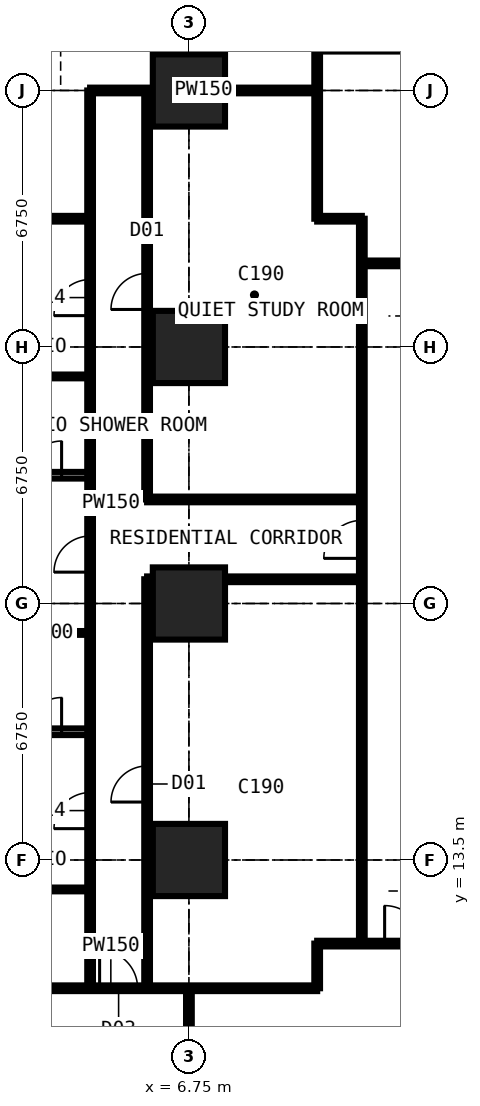
"""IFC4 building model, lengths in metres.
Left out: names, types, materials, properties, quantities, classifications, styles, units other than length and angle.
Written with IfcOpenShell. Run it as: python <this file> out.ifc"""

import sys

from ifc_helpers import new_model, si_unit, direction, frame, frame_2d, origin, origin_2d, place, context, subcontext, project, spatial, rectangle, extrude, element, fill, save


model = new_model("IFC4")
c1 = context("Model", 3, precision=1e-05, world=origin(), true_north=direction((0.0, 1.0)))
c2 = subcontext(c1, "Body", "Model", "MODEL_VIEW")
j1 = project(units=[si_unit("LENGTHUNIT", "METRE"), si_unit("PLANEANGLEUNIT", "RADIAN")], contexts=[c1])
p1 = place(None, origin())
s1 = spatial("IfcSite", under=j1, at=p1, CompositionType="ELEMENT")
p2 = place(p1, origin())
s2 = spatial("IfcBuilding", under=s1, at=p2, CompositionType="ELEMENT")
p3 = place(p2, frame((0.0, 0.0, 28.8)))
s3 = spatial("IfcBuildingStorey", under=s2, at=p3, CompositionType="ELEMENT", Elevation=28.8)
for number, where, z_axis, x_axis in (
    (1, (6.75, 13.5, 0.0), (0.0, 0.0, 1.0), (1.0, 0.0, 0.0)),
    (2, (6.75, 20.25, 0.0), (0.0, 0.0, 1.0), (1.0, 0.0, 0.0)),
    (3, (6.75, 27.0, 0.0), (0.0, 0.0, 1.0), (1.0, 0.0, 0.0)),
    (4, (6.75, 33.75, 0.0), (0.0, 0.0, 1.0), (1.0, 0.0, 0.0)),
):
    element("IfcColumn", number, at=place(p3, frame(where, z_axis=z_axis, x_axis=x_axis)), inside=s3, PredefinedType="COLUMN", context=c2, shape_type="SweptSolid", body=[
        extrude(rectangle(XDim=1.9, YDim=1.9, at=origin_2d()), origin(), (0.0, 0.0, 1.0), 3.6),
    ])
p4 = place(p3, frame((-0.734, 10.125, 0.0), z_axis=(0.0, 0.0, 1.0), x_axis=(1.0, 0.0, 0.0)))
e5 = element("IfcWall", 5, at=p4, inside=s3, PredefinedType="PARTITIONING", context=c2, shape_type="SweptSolid", body=[
    extrude(rectangle(XDim=10.859, YDim=0.15, at=frame_2d((5.429, 0.0))), origin(), (0.0, 0.0, 1.0), 3.375),
])
p5 = place(p4, frame((5.134, 0.0, 0.0)))
e6 = element("IfcOpeningElement", 6, at=p5, cuts=e5, PredefinedType="OPENING", context=c2, shape_type="SweptSolid", body=[
    extrude(rectangle(XDim=1.0, YDim=2.2, at=frame_2d((0.5, 1.1))), frame((0.0, 0.085, 0.0), z_axis=(0.0, -1.0, 0.0), x_axis=(1.0, 0.0, 0.0)), (0.0, 0.0, 1.0), 0.17),
])
p6 = place(p3, frame((-0.734, 16.875, 0.0), z_axis=(0.0, 0.0, 1.0), x_axis=(1.0, 0.0, 0.0)))
e7 = element("IfcWall", 7, at=p6, inside=s3, PredefinedType="PARTITIONING", context=c2, shape_type="SweptSolid", body=[
    extrude(rectangle(XDim=4.884, YDim=0.175, at=frame_2d((2.442, 0.0))), origin(), (0.0, 0.0, 1.0), 3.375),
])
p7 = place(p6, frame((3.234, 0.0, 0.0)))
e8 = element("IfcOpeningElement", 8, at=p7, cuts=e7, PredefinedType="OPENING", context=c2, shape_type="SweptSolid", body=[
    extrude(rectangle(XDim=0.9, YDim=2.2, at=frame_2d((0.45, 1.1))), frame((0.0, 0.097, 0.0), z_axis=(0.0, -1.0, 0.0), x_axis=(1.0, 0.0, 0.0)), (0.0, 0.0, 1.0), 0.195),
])
p8 = place(p3, frame((-0.734, 23.625, 0.0), z_axis=(0.0, 0.0, 1.0), x_axis=(1.0, 0.0, 0.0)))
e9 = element("IfcWall", 9, at=p8, inside=s3, PredefinedType="PARTITIONING", context=c2, shape_type="SweptSolid", body=[
    extrude(rectangle(XDim=4.884, YDim=0.175, at=frame_2d((2.442, 0.0))), origin(), (0.0, 0.0, 1.0), 3.375),
])
p9 = place(p8, frame((3.234, 0.0, 0.0)))
e10 = element("IfcOpeningElement", 10, at=p9, cuts=e9, PredefinedType="OPENING", context=c2, shape_type="SweptSolid", body=[
    extrude(rectangle(XDim=0.9, YDim=2.2, at=frame_2d((0.45, 1.1))), frame((0.0, 0.097, 0.0), z_axis=(0.0, -1.0, 0.0), x_axis=(1.0, 0.0, 0.0)), (0.0, 0.0, 1.0), 0.195),
])
p10 = place(p3, frame((-0.734, 30.375, 0.0), z_axis=(0.0, 0.0, 1.0), x_axis=(1.0, 0.0, 0.0)))
e11 = element("IfcWall", 11, at=p10, inside=s3, PredefinedType="PARTITIONING", context=c2, shape_type="SweptSolid", body=[
    extrude(rectangle(XDim=4.884, YDim=0.15, at=frame_2d((2.442, 0.0))), origin(), (0.0, 0.0, 1.0), 3.375),
])
for number, where, z_axis, x_axis in (
    (12, (1.75, 12.725, 0.0), (0.0, 0.0, 1.0), (1.0, 0.0, 0.0)),
    (13, (1.75, 19.475, 0.0), (0.0, 0.0, 1.0), (1.0, 0.0, 0.0)),
    (14, (1.75, 26.225, 0.0), (0.0, 0.0, 1.0), (1.0, 0.0, 0.0)),
):
    element("IfcWall", number, at=place(p3, frame(where, z_axis=z_axis, x_axis=x_axis)), inside=s3, PredefinedType="PARTITIONING", context=c2, shape_type="SweptSolid", body=[
        extrude(rectangle(XDim=2.4, YDim=0.1, at=frame_2d((1.2, 0.0))), origin(), (0.0, 0.0, 1.0), 3.375),
    ])
p11 = place(p3, frame((4.15, 10.125, 0.0), z_axis=(0.0, 0.0, 1.0), x_axis=(0.0, 1.0, 0.0)))
e15 = element("IfcWall", 15, at=p11, inside=s3, PredefinedType="PARTITIONING", context=c2, shape_type="SweptSolid", body=[
    extrude(rectangle(XDim=23.625, YDim=0.15, at=frame_2d((11.812, 0.0))), origin(), (0.0, 0.0, 1.0), 3.375),
])
p12 = place(p11, frame((4.2, 0.0, 0.0)))
e16 = element("IfcOpeningElement", 16, at=p12, cuts=e15, PredefinedType="OPENING", context=c2, shape_type="SweptSolid", body=[
    extrude(rectangle(XDim=0.95, YDim=2.2, at=frame_2d((0.475, 1.1))), frame((0.0, 0.085, 0.0), z_axis=(0.0, -1.0, 0.0), x_axis=(1.0, 0.0, 0.0)), (0.0, 0.0, 1.0), 0.17),
])
p13 = place(p11, frame((10.95, 0.0, 0.0)))
e17 = element("IfcOpeningElement", 17, at=p13, cuts=e15, PredefinedType="OPENING", context=c2, shape_type="SweptSolid", body=[
    extrude(rectangle(XDim=0.95, YDim=2.2, at=frame_2d((0.475, 1.1))), frame((0.0, 0.085, 0.0), z_axis=(0.0, -1.0, 0.0), x_axis=(1.0, 0.0, 0.0)), (0.0, 0.0, 1.0), 0.17),
])
p14 = place(p11, frame((17.7, 0.0, 0.0)))
e18 = element("IfcOpeningElement", 18, at=p14, cuts=e15, PredefinedType="OPENING", context=c2, shape_type="SweptSolid", body=[
    extrude(rectangle(XDim=0.95, YDim=2.2, at=frame_2d((0.475, 1.1))), frame((0.0, 0.085, 0.0), z_axis=(0.0, -1.0, 0.0), x_axis=(1.0, 0.0, 0.0)), (0.0, 0.0, 1.0), 0.17),
])
p15 = place(p3, frame((4.15, 33.75, 0.0), z_axis=(0.0, 0.0, 1.0), x_axis=(1.0, 0.0, 0.0)))
e19 = element("IfcWall", 19, at=p15, inside=s3, PredefinedType="PARTITIONING", context=c2, shape_type="SweptSolid", body=[
    extrude(rectangle(XDim=5.975, YDim=0.15, at=frame_2d((2.988, 0.0))), origin(), (0.0, 0.0, 1.0), 2.877),
])
p16 = place(p3, frame((5.65, 10.125, 0.0), z_axis=(0.0, 0.0, 1.0), x_axis=(0.0, 1.0, 0.0)))
e20 = element("IfcWall", 20, at=p16, inside=s3, PredefinedType="PARTITIONING", context=c2, shape_type="SweptSolid", body=[
    extrude(rectangle(XDim=10.762, YDim=0.15, at=frame_2d((5.381, 0.0))), origin(), (0.0, 0.0, 1.0), 3.375),
])
p17 = place(p16, frame((4.9, 0.0, 0.0)))
e21 = element("IfcOpeningElement", 21, at=p17, cuts=e20, PredefinedType="OPENING", context=c2, shape_type="SweptSolid", body=[
    extrude(rectangle(XDim=0.95, YDim=2.2, at=frame_2d((0.475, 1.1))), frame((0.0, 0.085, 0.0), z_axis=(0.0, -1.0, 0.0), x_axis=(1.0, 0.0, 0.0)), (0.0, 0.0, 1.0), 0.17),
])
p18 = place(p3, frame((5.65, 20.887, 0.0), z_axis=(0.0, 0.0, 1.0), x_axis=(1.0, 0.0, 0.0)))
e22 = element("IfcWall", 22, at=p18, inside=s3, PredefinedType="PARTITIONING", context=c2, shape_type="SweptSolid", body=[
    extrude(rectangle(XDim=5.65, YDim=0.15, at=frame_2d((2.825, 0.0))), origin(), (0.0, 0.0, 1.0), 3.375),
])
p19 = place(p3, frame((5.65, 22.988, 0.0), z_axis=(0.0, 0.0, 1.0), x_axis=(0.0, 1.0, 0.0)))
e23 = element("IfcWall", 23, at=p19, inside=s3, PredefinedType="PARTITIONING", context=c2, shape_type="SweptSolid", body=[
    extrude(rectangle(XDim=10.762, YDim=0.15, at=frame_2d((5.381, 0.0))), origin(), (0.0, 0.0, 1.0), 3.375),
])
p20 = place(p19, frame((5.0, 0.0, 0.0)))
e24 = element("IfcOpeningElement", 24, at=p20, cuts=e23, PredefinedType="OPENING", context=c2, shape_type="SweptSolid", body=[
    extrude(rectangle(XDim=0.95, YDim=2.2, at=frame_2d((0.475, 1.1))), frame((0.0, 0.085, 0.0), z_axis=(0.0, -1.0, 0.0), x_axis=(1.0, 0.0, 0.0)), (0.0, 0.0, 1.0), 0.17),
])
p21 = place(p3, frame((5.65, 22.988, 0.0), z_axis=(0.0, 0.0, 1.0), x_axis=(1.0, 0.0, 0.0)))
e25 = element("IfcWall", 25, at=p21, inside=s3, PredefinedType="PARTITIONING", context=c2, shape_type="SweptSolid", body=[
    extrude(rectangle(XDim=5.65, YDim=0.15, at=frame_2d((2.825, 0.0))), origin(), (0.0, 0.0, 1.0), 3.375),
])
p22 = place(p3, frame((6.75, -0.734, 0.0), z_axis=(0.0, 0.0, 1.0), x_axis=(0.0, 1.0, 0.0)))
e26 = element("IfcWall", 26, at=p22, inside=s3, PredefinedType="PARTITIONING", context=c2, shape_type="SweptSolid", body=[
    extrude(rectangle(XDim=10.859, YDim=0.15, at=frame_2d((5.429, 0.0))), origin(), (0.0, 0.0, 1.0), 2.877),
])
p23 = place(p3, frame((10.125, 10.125, 0.0), z_axis=(0.0, 0.0, 1.0), x_axis=(0.0, 1.0, 0.0)))
e27 = element("IfcWall", 27, at=p23, inside=s3, PredefinedType="PARTITIONING", context=c2, shape_type="SweptSolid", body=[
    extrude(rectangle(XDim=1.175, YDim=0.15, at=frame_2d((0.587, 0.0))), origin(), (0.0, 0.0, 1.0), 3.375),
])
p24 = place(p3, frame((10.125, 11.3, 0.0), z_axis=(0.0, 0.0, 1.0), x_axis=(1.0, 0.0, 0.0)))
e28 = element("IfcWall", 28, at=p24, inside=s3, PredefinedType="PARTITIONING", context=c2, shape_type="SweptSolid", body=[
    extrude(rectangle(XDim=20.675, YDim=0.15, at=frame_2d((10.337, 0.0))), origin(), (0.0, 0.0, 1.0), 3.375),
])
p25 = place(p24, frame((1.775, 0.0, 0.0)))
e29 = element("IfcOpeningElement", 29, at=p25, cuts=e28, PredefinedType="OPENING", context=c2, shape_type="SweptSolid", body=[
    extrude(rectangle(XDim=1.0, YDim=2.2, at=frame_2d((0.5, 1.1))), frame((0.0, 0.085, 0.0), z_axis=(0.0, -1.0, 0.0), x_axis=(1.0, 0.0, 0.0)), (0.0, 0.0, 1.0), 0.17),
])
p26 = place(p24, frame((11.312, 0.0, 0.0)))
e30 = element("IfcOpeningElement", 30, at=p26, cuts=e28, PredefinedType="OPENING", context=c2, shape_type="SweptSolid", body=[
    extrude(rectangle(XDim=1.0, YDim=2.2, at=frame_2d((0.5, 1.1))), frame((0.0, 0.085, 0.0), z_axis=(0.0, -1.0, 0.0), x_axis=(1.0, 0.0, 0.0)), (0.0, 0.0, 1.0), 0.17),
])
p27 = place(p3, frame((10.125, 30.375, 0.0), z_axis=(0.0, 0.0, 1.0), x_axis=(0.0, 1.0, 0.0)))
e31 = element("IfcWall", 31, at=p27, inside=s3, PredefinedType="PARTITIONING", context=c2, shape_type="SweptSolid", body=[
    extrude(rectangle(XDim=10.859, YDim=0.15, at=frame_2d((5.429, 0.0))), origin(), (0.0, 0.0, 1.0), 3.375),
])
p28 = place(p27, frame((4.725, 0.0, 0.0)))
e32 = element("IfcOpeningElement", 32, at=p28, cuts=e31, PredefinedType="OPENING", context=c2, shape_type="SweptSolid", body=[
    extrude(rectangle(XDim=1.0, YDim=2.2, at=frame_2d((0.5, 1.1))), frame((0.0, 0.085, 0.0), z_axis=(0.0, -1.0, 0.0), x_axis=(1.0, 0.0, 0.0)), (0.0, 0.0, 1.0), 0.17),
])
p29 = place(p3, frame((10.125, 30.375, 0.0), z_axis=(0.0, 0.0, 1.0), x_axis=(1.0, 0.0, 0.0)))
e33 = element("IfcWall", 33, at=p29, inside=s3, PredefinedType="PARTITIONING", context=c2, shape_type="SweptSolid", body=[
    extrude(rectangle(XDim=1.175, YDim=0.15, at=frame_2d((0.587, 0.0))), origin(), (0.0, 0.0, 1.0), 3.375),
])
p30 = place(p3, frame((11.3, 11.3, 0.0), z_axis=(0.0, 0.0, 1.0), x_axis=(0.0, 1.0, 0.0)))
e34 = element("IfcWall", 34, at=p30, inside=s3, PredefinedType="PARTITIONING", context=c2, shape_type="SweptSolid", body=[
    extrude(rectangle(XDim=19.075, YDim=0.15, at=frame_2d((9.538, 0.0))), origin(), (0.0, 0.0, 1.0), 3.375),
])
p31 = place(p30, frame((10.137, 0.0, 0.0)))
e35 = element("IfcOpeningElement", 35, at=p31, cuts=e34, PredefinedType="OPENING", context=c2, shape_type="SweptSolid", body=[
    extrude(rectangle(XDim=1.0, YDim=2.2, at=frame_2d((0.5, 1.1))), frame((0.0, 0.085, 0.0), z_axis=(0.0, -1.0, 0.0), x_axis=(1.0, 0.0, 0.0)), (0.0, 0.0, 1.0), 0.17),
])
p32 = place(p3, frame((11.3, 29.2, 0.0), z_axis=(0.0, 0.0, 1.0), x_axis=(1.0, 0.0, 0.0)))
e36 = element("IfcWall", 36, at=p32, inside=s3, PredefinedType="PARTITIONING", context=c2, shape_type="SweptSolid", body=[
    extrude(rectangle(XDim=19.075, YDim=0.15, at=frame_2d((9.538, 0.0))), origin(), (0.0, 0.0, 1.0), 3.375),
])
p33 = place(p32, frame((12.875, 0.0, 0.0)))
e37 = element("IfcOpeningElement", 37, at=p33, cuts=e36, PredefinedType="OPENING", context=c2, shape_type="SweptSolid", body=[
    extrude(rectangle(XDim=1.0, YDim=2.2, at=frame_2d((0.5, 1.1))), frame((0.0, 0.085, 0.0), z_axis=(0.0, -1.0, 0.0), x_axis=(1.0, 0.0, 0.0)), (0.0, 0.0, 1.0), 0.17),
])
p34 = place(p32, frame((10.438, 0.0, 0.0)))
e38 = element("IfcOpeningElement", 38, at=p34, cuts=e36, PredefinedType="OPENING", context=c2, shape_type="SweptSolid", body=[
    extrude(rectangle(XDim=1.0, YDim=2.2, at=frame_2d((0.5, 1.1))), frame((0.0, 0.085, 0.0), z_axis=(0.0, -1.0, 0.0), x_axis=(1.0, 0.0, 0.0)), (0.0, 0.0, 1.0), 0.17),
])
p35 = place(p32, frame((14.875, 0.0, 0.0)))
e39 = element("IfcOpeningElement", 39, at=p35, cuts=e36, PredefinedType="OPENING", context=c2, shape_type="SweptSolid", body=[
    extrude(rectangle(XDim=0.95, YDim=2.2, at=frame_2d((0.475, 1.1))), frame((0.0, 0.085, 0.0), z_axis=(0.0, -1.0, 0.0), x_axis=(1.0, 0.0, 0.0)), (0.0, 0.0, 1.0), 0.17),
])
p36 = place(p5, origin())
e40 = element("IfcDoor", 40, at=p36, inside=s3, OperationType="SINGLE_SWING_LEFT", PredefinedType="DOOR", context=c2, shape_type="SweptSolid", body=[
    extrude(rectangle(XDim=1.0, YDim=2.2, at=frame_2d((0.5, 1.1))), frame((0.0, 0.025, 0.0), z_axis=(0.0, -1.0, 0.0), x_axis=(1.0, 0.0, 0.0)), (0.0, 0.0, 1.0), 0.05),
])
fill(e6, e40)
p37 = place(p25, origin())
e41 = element("IfcDoor", 41, at=p37, inside=s3, OperationType="SINGLE_SWING_LEFT", PredefinedType="DOOR", context=c2, shape_type="SweptSolid", body=[
    extrude(rectangle(XDim=1.0, YDim=2.2, at=frame_2d((0.5, 1.1))), frame((0.0, 0.025, 0.0), z_axis=(0.0, -1.0, 0.0), x_axis=(1.0, 0.0, 0.0)), (0.0, 0.0, 1.0), 0.05),
])
fill(e29, e41)
p38 = place(p12, origin())
e42 = element("IfcDoor", 42, at=p38, inside=s3, OperationType="SINGLE_SWING_LEFT", PredefinedType="DOOR", context=c2, shape_type="SweptSolid", body=[
    extrude(rectangle(XDim=0.95, YDim=2.2, at=frame_2d((0.475, 1.1))), frame((0.0, 0.025, 0.0), z_axis=(0.0, -1.0, 0.0), x_axis=(1.0, 0.0, 0.0)), (0.0, 0.0, 1.0), 0.05),
])
fill(e16, e42)
p39 = place(p13, origin())
e43 = element("IfcDoor", 43, at=p39, inside=s3, OperationType="SINGLE_SWING_LEFT", PredefinedType="DOOR", context=c2, shape_type="SweptSolid", body=[
    extrude(rectangle(XDim=0.95, YDim=2.2, at=frame_2d((0.475, 1.1))), frame((0.0, 0.025, 0.0), z_axis=(0.0, -1.0, 0.0), x_axis=(1.0, 0.0, 0.0)), (0.0, 0.0, 1.0), 0.05),
])
fill(e17, e43)
p40 = place(p7, origin())
e44 = element("IfcDoor", 44, at=p40, inside=s3, OperationType="SINGLE_SWING_RIGHT", PredefinedType="DOOR", context=c2, shape_type="SweptSolid", body=[
    extrude(rectangle(XDim=0.9, YDim=2.2, at=frame_2d((0.45, 1.1))), frame((0.0, 0.025, 0.0), z_axis=(0.0, -1.0, 0.0), x_axis=(1.0, 0.0, 0.0)), (0.0, 0.0, 1.0), 0.05),
])
fill(e8, e44)
p41 = place(p14, origin())
e45 = element("IfcDoor", 45, at=p41, inside=s3, OperationType="SINGLE_SWING_LEFT", PredefinedType="DOOR", context=c2, shape_type="SweptSolid", body=[
    extrude(rectangle(XDim=0.95, YDim=2.2, at=frame_2d((0.475, 1.1))), frame((0.0, 0.025, 0.0), z_axis=(0.0, -1.0, 0.0), x_axis=(1.0, 0.0, 0.0)), (0.0, 0.0, 1.0), 0.05),
])
fill(e18, e45)
p42 = place(p9, origin())
e46 = element("IfcDoor", 46, at=p42, inside=s3, OperationType="SINGLE_SWING_RIGHT", PredefinedType="DOOR", context=c2, shape_type="SweptSolid", body=[
    extrude(rectangle(XDim=0.9, YDim=2.2, at=frame_2d((0.45, 1.1))), frame((0.0, 0.025, 0.0), z_axis=(0.0, -1.0, 0.0), x_axis=(1.0, 0.0, 0.0)), (0.0, 0.0, 1.0), 0.05),
])
fill(e10, e46)
p43 = place(p31, origin())
e47 = element("IfcDoor", 47, at=p43, inside=s3, OperationType="SINGLE_SWING_LEFT", PredefinedType="DOOR", context=c2, shape_type="SweptSolid", body=[
    extrude(rectangle(XDim=1.0, YDim=2.2, at=frame_2d((0.5, 1.1))), frame((0.0, 0.025, 0.0), z_axis=(0.0, -1.0, 0.0), x_axis=(1.0, 0.0, 0.0)), (0.0, 0.0, 1.0), 0.05),
])
fill(e35, e47)
p44 = place(p17, origin())
e48 = element("IfcDoor", 48, at=p44, inside=s3, OperationType="SINGLE_SWING_LEFT", PredefinedType="DOOR", context=c2, shape_type="SweptSolid", body=[
    extrude(rectangle(XDim=0.95, YDim=2.2, at=frame_2d((0.475, 1.1))), frame((0.0, 0.025, 0.0), z_axis=(0.0, -1.0, 0.0), x_axis=(1.0, 0.0, 0.0)), (0.0, 0.0, 1.0), 0.05),
])
fill(e21, e48)
p45 = place(p20, origin())
e49 = element("IfcDoor", 49, at=p45, inside=s3, OperationType="SINGLE_SWING_LEFT", PredefinedType="DOOR", context=c2, shape_type="SweptSolid", body=[
    extrude(rectangle(XDim=0.95, YDim=2.2, at=frame_2d((0.475, 1.1))), frame((0.0, 0.025, 0.0), z_axis=(0.0, -1.0, 0.0), x_axis=(1.0, 0.0, 0.0)), (0.0, 0.0, 1.0), 0.05),
])
fill(e24, e49)
save(model, sys.argv[1])
